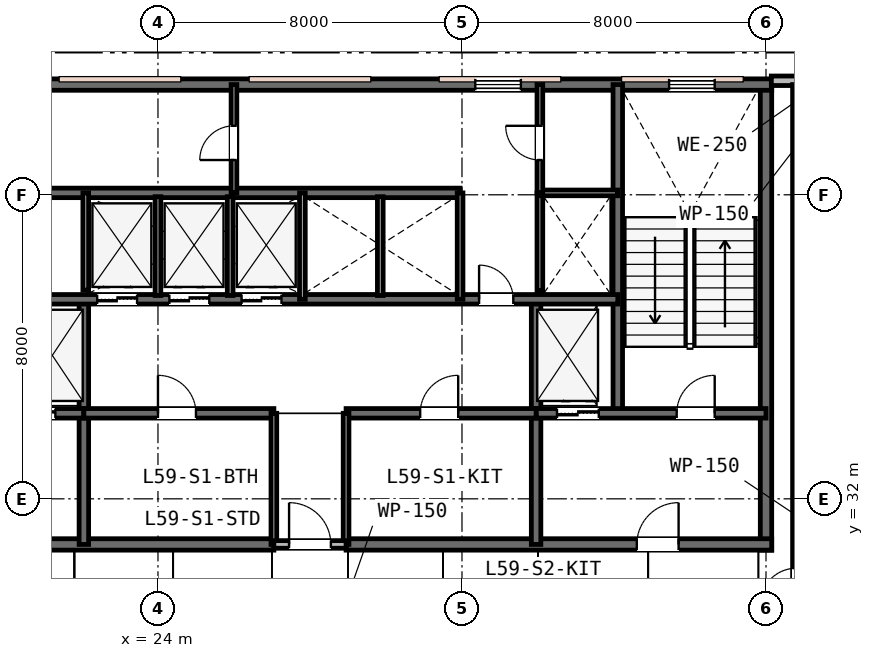
"""IFC4 building model, lengths in metres.
Left out: names, types, materials, properties, quantities, classifications, styles, units other than length and angle.
Written with IfcOpenShell. Run it as: python <this file> out.ifc"""

import sys

from ifc_helpers import new_model, si_unit, direction, frame, frame_2d, origin, place, context, subcontext, project, spatial, rectangle, extrude, element, fill, save


model = new_model("IFC4")
c1 = context("Model", 3, precision=1e-05, world=origin(), true_north=direction((0.0, 1.0)))
c2 = subcontext(c1, "Body", "Model", "MODEL_VIEW")
j1 = project(units=[si_unit("LENGTHUNIT", "METRE"), si_unit("PLANEANGLEUNIT", "RADIAN")], contexts=[c1])
p1 = place(None, origin())
s1 = spatial("IfcSite", under=j1, at=p1, CompositionType="ELEMENT")
p2 = place(p1, origin())
s2 = spatial("IfcBuilding", under=s1, at=p2, CompositionType="ELEMENT")
p3 = place(p2, frame((0.0, 0.0, 229.8)))
s3 = spatial("IfcBuildingStorey", under=s2, at=p3, CompositionType="ELEMENT", Elevation=229.8)
p4 = place(p3, frame((40.0, 30.65, 0.0), z_axis=(0.0, 0.0, 1.0), x_axis=(0.0, 1.0, 0.0)))
e1 = element("IfcWall", 1, at=p4, inside=s3, PredefinedType="SHEAR", context=c2, shape_type="SweptSolid", body=[
    extrude(rectangle(XDim=12.3, YDim=0.3, at=frame_2d((6.15, 0.0))), origin(), (0.0, 0.0, 1.0), 3.8),
])
p5 = place(p3, frame((15.85, 42.9, 0.0), z_axis=(0.0, 0.0, 1.0), x_axis=(1.0, 0.0, 0.0)))
e2 = element("IfcWall", 2, at=p5, inside=s3, PredefinedType="SHEAR", context=c2, shape_type="SweptSolid", body=[
    extrude(rectangle(XDim=24.3, YDim=0.3, at=frame_2d((12.15, 0.0))), origin(), (0.0, 0.0, 1.0), 3.8),
])
p6 = place(p5, frame((1.6, 0.0, 0.95)))
e3 = element("IfcOpeningElement", 3, at=p6, cuts=e2, PredefinedType="OPENING", context=c2, shape_type="SweptSolid", body=[
    extrude(rectangle(XDim=1.2, YDim=1.6, at=frame_2d((0.6, 0.8))), frame((0.0, 0.16, 0.0), z_axis=(0.0, -1.0, 0.0), x_axis=(1.0, 0.0, 0.0)), (0.0, 0.0, 1.0), 0.32),
])
p7 = place(p5, frame((16.5, 0.0, 0.95)))
e4 = element("IfcOpeningElement", 4, at=p7, cuts=e2, PredefinedType="OPENING", context=c2, shape_type="SweptSolid", body=[
    extrude(rectangle(XDim=1.2, YDim=1.6, at=frame_2d((0.6, 0.8))), frame((0.0, 0.16, 0.0), z_axis=(0.0, -1.0, 0.0), x_axis=(1.0, 0.0, 0.0)), (0.0, 0.0, 1.0), 0.32),
])
p8 = place(p5, frame((21.6, 0.0, 0.95)))
e5 = element("IfcOpeningElement", 5, at=p8, cuts=e2, PredefinedType="OPENING", context=c2, shape_type="SweptSolid", body=[
    extrude(rectangle(XDim=1.2, YDim=1.6, at=frame_2d((0.6, 0.8))), frame((0.0, 0.16, 0.0), z_axis=(0.0, -1.0, 0.0), x_axis=(1.0, 0.0, 0.0)), (0.0, 0.0, 1.0), 0.32),
])
p9 = place(p3, frame((15.85, 30.8, 0.0), z_axis=(0.0, 0.0, 1.0), x_axis=(1.0, 0.0, 0.0)))
e6 = element("IfcWall", 6, at=p9, inside=s3, PredefinedType="SHEAR", context=c2, shape_type="SweptSolid", body=[
    extrude(rectangle(XDim=11.2, YDim=0.3, at=frame_2d((5.6, 0.0))), origin(), (0.0, 0.0, 1.0), 3.8),
])
p10 = place(p9, frame((2.45, 0.0, 0.0)))
e7 = element("IfcOpeningElement", 7, at=p10, cuts=e6, PredefinedType="OPENING", context=c2, shape_type="SweptSolid", body=[
    extrude(rectangle(XDim=1.1, YDim=2.15, at=frame_2d((0.55, 1.075))), frame((0.0, 0.16, 0.0), z_axis=(0.0, -1.0, 0.0), x_axis=(1.0, 0.0, 0.0)), (0.0, 0.0, 1.0), 0.32),
])
p11 = place(p3, frame((28.95, 30.8, 0.0), z_axis=(0.0, 0.0, 1.0), x_axis=(1.0, 0.0, 0.0)))
e8 = element("IfcWall", 8, at=p11, inside=s3, PredefinedType="SHEAR", context=c2, shape_type="SweptSolid", body=[
    extrude(rectangle(XDim=11.2, YDim=0.3, at=frame_2d((5.6, 0.0))), origin(), (0.0, 0.0, 1.0), 3.8),
])
p12 = place(p11, frame((7.65, 0.0, 0.0)))
e9 = element("IfcOpeningElement", 9, at=p12, cuts=e8, PredefinedType="OPENING", context=c2, shape_type="SweptSolid", body=[
    extrude(rectangle(XDim=1.1, YDim=2.15, at=frame_2d((0.55, 1.075))), frame((0.0, 0.16, 0.0), z_axis=(0.0, -1.0, 0.0), x_axis=(1.0, 0.0, 0.0)), (0.0, 0.0, 1.0), 0.32),
])
p13 = place(p3, frame((36.1, 34.25, 0.0), z_axis=(0.0, 0.0, 1.0), x_axis=(0.0, 1.0, 0.0)))
e10 = element("IfcWall", 10, at=p13, inside=s3, PredefinedType="SHEAR", context=c2, shape_type="SweptSolid", body=[
    extrude(rectangle(XDim=8.65, YDim=0.25, at=frame_2d((4.325, 0.0))), origin(), (0.0, 0.0, 1.0), 3.8),
])
for number, where, z_axis, x_axis in (
    (11, (22.05, 30.8, 0.0), (0.0, 0.0, 1.0), (0.0, 1.0, 0.0)),
    (12, (33.95, 30.8, 0.0), (0.0, 0.0, 1.0), (0.0, 1.0, 0.0)),
):
    element("IfcWall", number, at=place(p3, frame(where, z_axis=z_axis, x_axis=x_axis)), inside=s3, PredefinedType="SHEAR", context=c2, shape_type="SweptSolid", body=[
        extrude(rectangle(XDim=6.45, YDim=0.25, at=frame_2d((3.225, 0.0))), origin(), (0.0, 0.0, 1.0), 3.8),
    ])
p14 = place(p3, frame((16.0, 34.25, 0.0), z_axis=(0.0, 0.0, 1.0), x_axis=(1.0, 0.0, 0.0)))
e13 = element("IfcWall", 13, at=p14, inside=s3, PredefinedType="SHEAR", context=c2, shape_type="SweptSolid", body=[
    extrude(rectangle(XDim=6.05, YDim=0.25, at=frame_2d((3.025, 0.0))), origin(), (0.0, 0.0, 1.0), 3.8),
])
p15 = place(p14, frame((1.25, 0.0, 0.0)))
e14 = element("IfcOpeningElement", 14, at=p15, cuts=e13, PredefinedType="OPENING", context=c2, shape_type="SweptSolid", body=[
    extrude(rectangle(XDim=1.0, YDim=2.15, at=frame_2d((0.5, 1.075))), frame((0.0, 0.135, 0.0), z_axis=(0.0, -1.0, 0.0), x_axis=(1.0, 0.0, 0.0)), (0.0, 0.0, 1.0), 0.27),
])
p16 = place(p14, frame((4.2, 0.0, 0.0)))
e15 = element("IfcOpeningElement", 15, at=p16, cuts=e13, PredefinedType="OPENING", context=c2, shape_type="SweptSolid", body=[
    extrude(rectangle(XDim=1.1, YDim=2.15, at=frame_2d((0.55, 1.075))), frame((0.0, 0.135, 0.0), z_axis=(0.0, -1.0, 0.0), x_axis=(1.0, 0.0, 0.0)), (0.0, 0.0, 1.0), 0.27),
])
p17 = place(p3, frame((33.95, 34.25, 0.0), z_axis=(0.0, 0.0, 1.0), x_axis=(1.0, 0.0, 0.0)))
e16 = element("IfcWall", 16, at=p17, inside=s3, PredefinedType="SHEAR", context=c2, shape_type="SweptSolid", body=[
    extrude(rectangle(XDim=6.05, YDim=0.25, at=frame_2d((3.025, 0.0))), origin(), (0.0, 0.0, 1.0), 3.8),
])
p18 = place(p17, frame((3.7, 0.0, 0.0)))
e17 = element("IfcOpeningElement", 17, at=p18, cuts=e16, PredefinedType="OPENING", context=c2, shape_type="SweptSolid", body=[
    extrude(rectangle(XDim=1.0, YDim=2.15, at=frame_2d((0.5, 1.075))), frame((0.0, 0.135, 0.0), z_axis=(0.0, -1.0, 0.0), x_axis=(1.0, 0.0, 0.0)), (0.0, 0.0, 1.0), 0.27),
])
p19 = place(p17, frame((0.55, 0.0, 0.0)))
e18 = element("IfcOpeningElement", 18, at=p19, cuts=e16, PredefinedType="OPENING", context=c2, shape_type="SweptSolid", body=[
    extrude(rectangle(XDim=1.1, YDim=2.15, at=frame_2d((0.55, 1.075))), frame((0.0, 0.135, 0.0), z_axis=(0.0, -1.0, 0.0), x_axis=(1.0, 0.0, 0.0)), (0.0, 0.0, 1.0), 0.27),
])
p20 = place(p3, frame((22.05, 34.25, 0.0), z_axis=(0.0, 0.0, 1.0), x_axis=(1.0, 0.0, 0.0)))
e19 = element("IfcWall", 19, at=p20, inside=s3, PredefinedType="SHEAR", context=c2, shape_type="SweptSolid", body=[
    extrude(rectangle(XDim=5.0, YDim=0.25, at=frame_2d((2.5, 0.0))), origin(), (0.0, 0.0, 1.0), 3.8),
])
p21 = place(p20, frame((1.95, 0.0, 0.0)))
e20 = element("IfcOpeningElement", 20, at=p21, cuts=e19, PredefinedType="OPENING", context=c2, shape_type="SweptSolid", body=[
    extrude(rectangle(XDim=1.0, YDim=2.15, at=frame_2d((0.5, 1.075))), frame((0.0, 0.135, 0.0), z_axis=(0.0, -1.0, 0.0), x_axis=(1.0, 0.0, 0.0)), (0.0, 0.0, 1.0), 0.27),
])
p22 = place(p3, frame((28.95, 34.25, 0.0), z_axis=(0.0, 0.0, 1.0), x_axis=(1.0, 0.0, 0.0)))
e21 = element("IfcWall", 21, at=p22, inside=s3, PredefinedType="SHEAR", context=c2, shape_type="SweptSolid", body=[
    extrude(rectangle(XDim=5.0, YDim=0.25, at=frame_2d((2.5, 0.0))), origin(), (0.0, 0.0, 1.0), 3.8),
])
p23 = place(p22, frame((1.95, 0.0, 0.0)))
e22 = element("IfcOpeningElement", 22, at=p23, cuts=e21, PredefinedType="OPENING", context=c2, shape_type="SweptSolid", body=[
    extrude(rectangle(XDim=1.0, YDim=2.15, at=frame_2d((0.5, 1.075))), frame((0.0, 0.135, 0.0), z_axis=(0.0, -1.0, 0.0), x_axis=(1.0, 0.0, 0.0)), (0.0, 0.0, 1.0), 0.27),
])
p24 = place(p3, frame((19.9, 37.25, 0.0), z_axis=(0.0, 0.0, 1.0), x_axis=(1.0, 0.0, 0.0)))
e23 = element("IfcWall", 23, at=p24, inside=s3, PredefinedType="SHEAR", context=c2, shape_type="SweptSolid", body=[
    extrude(rectangle(XDim=16.2, YDim=0.25, at=frame_2d((8.1, 0.0))), origin(), (0.0, 0.0, 1.0), 3.8),
])
p25 = place(p24, frame((12.55, 0.0, 0.0)))
e24 = element("IfcOpeningElement", 24, at=p25, cuts=e23, PredefinedType="OPENING", context=c2, shape_type="SweptSolid", body=[
    extrude(rectangle(XDim=0.9, YDim=2.15, at=frame_2d((0.45, 1.075))), frame((0.0, 0.135, 0.0), z_axis=(0.0, -1.0, 0.0), x_axis=(1.0, 0.0, 0.0)), (0.0, 0.0, 1.0), 0.27),
])
p26 = place(p24, frame((2.5, 0.0, 0.0)))
e25 = element("IfcOpeningElement", 25, at=p26, cuts=e23, PredefinedType="OPENING", context=c2, shape_type="SweptSolid", body=[
    extrude(rectangle(XDim=1.05, YDim=2.15, at=frame_2d((0.525, 1.075))), frame((0.0, 0.135, 0.0), z_axis=(0.0, -1.0, 0.0), x_axis=(1.0, 0.0, 0.0)), (0.0, 0.0, 1.0), 0.27),
])
p27 = place(p24, frame((4.4, 0.0, 0.0)))
e26 = element("IfcOpeningElement", 26, at=p27, cuts=e23, PredefinedType="OPENING", context=c2, shape_type="SweptSolid", body=[
    extrude(rectangle(XDim=1.05, YDim=2.15, at=frame_2d((0.525, 1.075))), frame((0.0, 0.135, 0.0), z_axis=(0.0, -1.0, 0.0), x_axis=(1.0, 0.0, 0.0)), (0.0, 0.0, 1.0), 0.27),
])
p28 = place(p24, frame((6.3, 0.0, 0.0)))
e27 = element("IfcOpeningElement", 27, at=p28, cuts=e23, PredefinedType="OPENING", context=c2, shape_type="SweptSolid", body=[
    extrude(rectangle(XDim=1.05, YDim=2.15, at=frame_2d((0.525, 1.075))), frame((0.0, 0.135, 0.0), z_axis=(0.0, -1.0, 0.0), x_axis=(1.0, 0.0, 0.0)), (0.0, 0.0, 1.0), 0.27),
])
p29 = place(p3, frame((19.9, 40.05, 0.0), z_axis=(0.0, 0.0, 1.0), x_axis=(1.0, 0.0, 0.0)))
e28 = element("IfcWall", 28, at=p29, inside=s3, PredefinedType="SHEAR", context=c2, shape_type="SweptSolid", body=[
    extrude(rectangle(XDim=12.05, YDim=0.25, at=frame_2d((6.025, 0.0))), origin(), (0.0, 0.0, 1.0), 3.8),
])
p30 = place(p3, frame((43.0, 43.0, 0.0), z_axis=(0.0, 0.0, 1.0), x_axis=(-1.0, 0.0, 0.0)))
e29 = element("IfcWall", 29, at=p30, inside=s3, PredefinedType="STANDARD", context=c2, shape_type="SweptSolid", body=[
    extrude(rectangle(XDim=2.86, YDim=0.25, at=frame_2d((1.43, 0.0))), origin(), (0.0, 0.0, 1.0), 3.53),
])
p31 = place(p30, frame((0.51, 0.0, 0.85)))
e30 = element("IfcOpeningElement", 30, at=p31, cuts=e29, PredefinedType="OPENING", context=c2, shape_type="SweptSolid", body=[
    extrude(rectangle(XDim=1.2, YDim=1.6, at=frame_2d((0.6, 0.8))), frame((0.0, 0.135, 0.0), z_axis=(0.0, -1.0, 0.0), x_axis=(1.0, 0.0, 0.0)), (0.0, 0.0, 1.0), 0.27),
])
for number, where, z_axis, x_axis in (
    (31, (27.05, 30.8, 0.0), (0.0, 0.0, 1.0), (0.0, 1.0, 0.0)),
    (32, (28.95, 30.8, 0.0), (0.0, 0.0, 1.0), (0.0, 1.0, 0.0)),
):
    element("IfcWall", number, at=place(p3, frame(where, z_axis=z_axis, x_axis=x_axis)), inside=s3, PredefinedType="PLUMBINGWALL", context=c2, shape_type="SweptSolid", body=[
        extrude(rectangle(XDim=3.45, YDim=0.15, at=frame_2d((1.725, 0.0))), origin(), (0.0, 0.0, 1.0), 3.22),
    ])
p32 = place(p3, frame((27.05, 30.8, 0.0), z_axis=(0.0, 0.0, 1.0), x_axis=(1.0, 0.0, 0.0)))
e33 = element("IfcWall", 33, at=p32, inside=s3, PredefinedType="PARTITIONING", context=c2, shape_type="SweptSolid", body=[
    extrude(rectangle(XDim=1.9, YDim=0.2, at=frame_2d((0.95, 0.0))), origin(), (0.0, 0.0, 1.0), 3.22),
])
p33 = place(p32, frame((0.4, 0.0, 0.0)))
e34 = element("IfcOpeningElement", 34, at=p33, cuts=e33, PredefinedType="OPENING", context=c2, shape_type="SweptSolid", body=[
    extrude(rectangle(XDim=1.1, YDim=2.15, at=frame_2d((0.55, 1.075))), frame((0.0, 0.11, 0.0), z_axis=(0.0, -1.0, 0.0), x_axis=(1.0, 0.0, 0.0)), (0.0, 0.0, 1.0), 0.22),
])
p34 = place(p3, frame((22.1, 37.49, 0.0), z_axis=(0.0, 0.0, 1.0), x_axis=(0.0, 1.0, 0.0)))
e35 = element("IfcWall", 35, at=p34, inside=s3, PredefinedType="PLUMBINGWALL", context=c2, shape_type="SweptSolid", body=[
    extrude(rectangle(XDim=2.56, YDim=0.15, at=frame_2d((1.28, 0.0))), origin(), (0.0, 0.0, 1.0), 3.53),
])
p35 = place(p3, frame((27.8, 37.25, 0.0), z_axis=(0.0, 0.0, 1.0), x_axis=(0.0, 1.0, 0.0)))
e36 = element("IfcWall", 36, at=p35, inside=s3, PredefinedType="PLUMBINGWALL", context=c2, shape_type="SweptSolid", body=[
    extrude(rectangle(XDim=2.8, YDim=0.15, at=frame_2d((1.4, 0.0))), origin(), (0.0, 0.0, 1.0), 3.53),
])
for number, where, z_axis, x_axis in (
    (37, (24.0, 37.35, 0.0), (0.0, 0.0, 1.0), (0.0, 1.0, 0.0)),
    (38, (25.9, 37.35, 0.0), (0.0, 0.0, 1.0), (0.0, 1.0, 0.0)),
):
    element("IfcWall", number, at=place(p3, frame(where, z_axis=z_axis, x_axis=x_axis)), inside=s3, PredefinedType="PLUMBINGWALL", context=c2, shape_type="SweptSolid", body=[
        extrude(rectangle(XDim=2.6, YDim=0.15, at=frame_2d((1.3, 0.0))), origin(), (0.0, 0.0, 1.0), 3.53),
    ])
p36 = place(p3, frame((31.95, 37.25, 0.0), z_axis=(0.0, 0.0, 1.0), x_axis=(0.0, 1.0, 0.0)))
e39 = element("IfcWall", 39, at=p36, inside=s3, PredefinedType="PLUMBINGWALL", context=c2, shape_type="SweptSolid", body=[
    extrude(rectangle(XDim=2.8, YDim=0.15, at=frame_2d((1.4, 0.0))), origin(), (0.0, 0.0, 1.0), 3.53),
])
p37 = place(p3, frame((29.85, 37.35, 0.0), z_axis=(0.0, 0.0, 1.0), x_axis=(0.0, 1.0, 0.0)))
e40 = element("IfcWall", 40, at=p37, inside=s3, PredefinedType="PLUMBINGWALL", context=c2, shape_type="SweptSolid", body=[
    extrude(rectangle(XDim=2.6, YDim=0.15, at=frame_2d((1.3, 0.0))), origin(), (0.0, 0.0, 1.0), 3.53),
])
p38 = place(p3, frame((34.05, 37.473, 0.0), z_axis=(0.0, 0.0, 1.0), x_axis=(0.0, 1.0, 0.0)))
e41 = element("IfcWall", 41, at=p38, inside=s3, PredefinedType="PLUMBINGWALL", context=c2, shape_type="SweptSolid", body=[
    extrude(rectangle(XDim=2.577, YDim=0.15, at=frame_2d((1.288, 0.0))), origin(), (0.0, 0.0, 1.0), 3.53),
])
p39 = place(p3, frame((34.05, 40.05, 0.0), z_axis=(0.0, 0.0, 1.0), x_axis=(1.0, 0.0, 0.0)))
e42 = element("IfcWall", 42, at=p39, inside=s3, PredefinedType="PARTITIONING", context=c2, shape_type="SweptSolid", body=[
    extrude(rectangle(XDim=2.05, YDim=0.15, at=frame_2d((1.025, 0.0))), origin(), (0.0, 0.0, 1.0), 3.53),
])
p40 = place(p3, frame((34.05, 40.05, 0.0), z_axis=(0.0, 0.0, 1.0), x_axis=(0.0, 1.0, 0.0)))
e43 = element("IfcWall", 43, at=p40, inside=s3, PredefinedType="PARTITIONING", context=c2, shape_type="SweptSolid", body=[
    extrude(rectangle(XDim=2.85, YDim=0.15, at=frame_2d((1.425, 0.0))), origin(), (0.0, 0.0, 1.0), 3.53),
])
p41 = place(p40, frame((0.865, 0.0, 0.0)))
e44 = element("IfcOpeningElement", 44, at=p41, cuts=e43, PredefinedType="OPENING", context=c2, shape_type="SweptSolid", body=[
    extrude(rectangle(XDim=0.9, YDim=2.15, at=frame_2d((0.45, 1.075))), frame((0.0, 0.085, 0.0), z_axis=(0.0, -1.0, 0.0), x_axis=(1.0, 0.0, 0.0)), (0.0, 0.0, 1.0), 0.17),
])
p42 = place(p3, frame((26.0, 40.05, 0.0), z_axis=(0.0, 0.0, 1.0), x_axis=(0.0, 1.0, 0.0)))
e45 = element("IfcWall", 45, at=p42, inside=s3, PredefinedType="PARTITIONING", context=c2, shape_type="SweptSolid", body=[
    extrude(rectangle(XDim=2.85, YDim=0.15, at=frame_2d((1.425, 0.0))), origin(), (0.0, 0.0, 1.0), 3.53),
])
p43 = place(p42, frame((0.865, 0.0, 0.0)))
e46 = element("IfcOpeningElement", 46, at=p43, cuts=e45, PredefinedType="OPENING", context=c2, shape_type="SweptSolid", body=[
    extrude(rectangle(XDim=0.9, YDim=2.15, at=frame_2d((0.45, 1.075))), frame((0.0, 0.085, 0.0), z_axis=(0.0, -1.0, 0.0), x_axis=(1.0, 0.0, 0.0)), (0.0, 0.0, 1.0), 0.17),
])
p44 = place(p3, frame((40.8, 28.6, 0.0), z_axis=(0.0, 0.0, 1.0), x_axis=(0.0, 1.0, 0.0)))
e47 = element("IfcWall", 47, at=p44, inside=s3, PredefinedType="PARTITIONING", context=c2, shape_type="SweptSolid", body=[
    extrude(rectangle(XDim=14.3, YDim=0.2, at=frame_2d((7.15, 0.0))), origin(), (0.0, 0.0, 1.0), 2.92),
])
p45 = place(p44, frame((0.625, 0.0, 0.0)))
e48 = element("IfcOpeningElement", 48, at=p45, cuts=e47, PredefinedType="OPENING", context=c2, shape_type="SweptSolid", body=[
    extrude(rectangle(XDim=0.95, YDim=2.15, at=frame_2d((0.475, 1.075))), frame((0.0, 0.11, 0.0), z_axis=(0.0, -1.0, 0.0), x_axis=(1.0, 0.0, 0.0)), (0.0, 0.0, 1.0), 0.22),
])
p46 = place(p7, origin())
e49 = element("IfcWindow", 49, at=p46, inside=s3, PartitioningType="SINGLE_PANEL", PredefinedType="WINDOW", context=c2, shape_type="SweptSolid", body=[
    extrude(rectangle(XDim=1.2, YDim=1.6, at=frame_2d((0.6, 0.8))), frame((0.0, 0.03, 0.0), z_axis=(0.0, -1.0, 0.0), x_axis=(1.0, 0.0, 0.0)), (0.0, 0.0, 1.0), 0.06),
])
fill(e4, e49)
p47 = place(p8, origin())
e50 = element("IfcWindow", 50, at=p47, inside=s3, PartitioningType="SINGLE_PANEL", PredefinedType="WINDOW", context=c2, shape_type="SweptSolid", body=[
    extrude(rectangle(XDim=1.2, YDim=1.6, at=frame_2d((0.6, 0.8))), frame((0.0, 0.03, 0.0), z_axis=(0.0, -1.0, 0.0), x_axis=(1.0, 0.0, 0.0)), (0.0, 0.0, 1.0), 0.06),
])
fill(e5, e50)
p48 = place(p33, origin())
e51 = element("IfcDoor", 51, at=p48, inside=s3, OperationType="SINGLE_SWING_LEFT", PredefinedType="DOOR", context=c2, shape_type="SweptSolid", body=[
    extrude(rectangle(XDim=1.1, YDim=2.15, at=frame_2d((0.55, 1.075))), frame((0.0, 0.025, 0.0), z_axis=(0.0, -1.0, 0.0), x_axis=(1.0, 0.0, 0.0)), (0.0, 0.0, 1.0), 0.05),
])
fill(e34, e51)
p49 = place(p18, origin())
e52 = element("IfcDoor", 52, at=p49, inside=s3, OperationType="SINGLE_SWING_RIGHT", PredefinedType="DOOR", context=c2, shape_type="SweptSolid", body=[
    extrude(rectangle(XDim=1.0, YDim=2.15, at=frame_2d((0.5, 1.075))), frame((0.0, 0.025, 0.0), z_axis=(0.0, -1.0, 0.0), x_axis=(1.0, 0.0, 0.0)), (0.0, 0.0, 1.0), 0.05),
])
fill(e17, e52)
p50 = place(p12, origin())
e53 = element("IfcDoor", 53, at=p50, inside=s3, OperationType="SINGLE_SWING_RIGHT", PredefinedType="DOOR", context=c2, shape_type="SweptSolid", body=[
    extrude(rectangle(XDim=1.1, YDim=2.15, at=frame_2d((0.55, 1.075))), frame((0.0, 0.025, 0.0), z_axis=(0.0, -1.0, 0.0), x_axis=(1.0, 0.0, 0.0)), (0.0, 0.0, 1.0), 0.05),
])
fill(e9, e53)
p51 = place(p21, origin())
e54 = element("IfcDoor", 54, at=p51, inside=s3, OperationType="SINGLE_SWING_LEFT", PredefinedType="DOOR", context=c2, shape_type="SweptSolid", body=[
    extrude(rectangle(XDim=1.0, YDim=2.15, at=frame_2d((0.5, 1.075))), frame((0.0, 0.025, 0.0), z_axis=(0.0, -1.0, 0.0), x_axis=(1.0, 0.0, 0.0)), (0.0, 0.0, 1.0), 0.05),
])
fill(e20, e54)
p52 = place(p23, origin())
e55 = element("IfcDoor", 55, at=p52, inside=s3, OperationType="SINGLE_SWING_RIGHT", PredefinedType="DOOR", context=c2, shape_type="SweptSolid", body=[
    extrude(rectangle(XDim=1.0, YDim=2.15, at=frame_2d((0.5, 1.075))), frame((0.0, 0.025, 0.0), z_axis=(0.0, -1.0, 0.0), x_axis=(1.0, 0.0, 0.0)), (0.0, 0.0, 1.0), 0.05),
])
fill(e22, e55)
p53 = place(p25, origin())
e56 = element("IfcDoor", 56, at=p53, inside=s3, OperationType="SINGLE_SWING_LEFT", PredefinedType="DOOR", context=c2, shape_type="SweptSolid", body=[
    extrude(rectangle(XDim=0.9, YDim=2.15, at=frame_2d((0.45, 1.075))), frame((0.0, 0.025, 0.0), z_axis=(0.0, -1.0, 0.0), x_axis=(1.0, 0.0, 0.0)), (0.0, 0.0, 1.0), 0.05),
])
fill(e24, e56)
p54 = place(p41, origin())
e57 = element("IfcDoor", 57, at=p54, inside=s3, OperationType="SINGLE_SWING_RIGHT", PredefinedType="DOOR", context=c2, shape_type="SweptSolid", body=[
    extrude(rectangle(XDim=0.9, YDim=2.15, at=frame_2d((0.45, 1.075))), frame((0.0, 0.025, 0.0), z_axis=(0.0, -1.0, 0.0), x_axis=(1.0, 0.0, 0.0)), (0.0, 0.0, 1.0), 0.05),
])
fill(e44, e57)
p55 = place(p43, origin())
e58 = element("IfcDoor", 58, at=p55, inside=s3, OperationType="SINGLE_SWING_LEFT", PredefinedType="DOOR", context=c2, shape_type="SweptSolid", body=[
    extrude(rectangle(XDim=0.9, YDim=2.15, at=frame_2d((0.45, 1.075))), frame((0.0, 0.025, 0.0), z_axis=(0.0, -1.0, 0.0), x_axis=(1.0, 0.0, 0.0)), (0.0, 0.0, 1.0), 0.05),
])
fill(e46, e58)
p56 = place(p16, origin())
e59 = element("IfcDoor", 59, at=p56, inside=s3, OperationType="DOUBLE_DOOR_SLIDING", PredefinedType="DOOR", context=c2, shape_type="SweptSolid", body=[
    extrude(rectangle(XDim=1.1, YDim=2.15, at=frame_2d((0.55, 1.075))), frame((0.0, 0.025, 0.0), z_axis=(0.0, -1.0, 0.0), x_axis=(1.0, 0.0, 0.0)), (0.0, 0.0, 1.0), 0.05),
])
fill(e15, e59)
p57 = place(p19, origin())
e60 = element("IfcDoor", 60, at=p57, inside=s3, OperationType="DOUBLE_DOOR_SLIDING", PredefinedType="DOOR", context=c2, shape_type="SweptSolid", body=[
    extrude(rectangle(XDim=1.1, YDim=2.15, at=frame_2d((0.55, 1.075))), frame((0.0, 0.025, 0.0), z_axis=(0.0, -1.0, 0.0), x_axis=(1.0, 0.0, 0.0)), (0.0, 0.0, 1.0), 0.05),
])
fill(e18, e60)
p58 = place(p26, origin())
e61 = element("IfcDoor", 61, at=p58, inside=s3, OperationType="DOUBLE_DOOR_SLIDING", PredefinedType="DOOR", context=c2, shape_type="SweptSolid", body=[
    extrude(rectangle(XDim=1.05, YDim=2.15, at=frame_2d((0.525, 1.075))), frame((0.0, 0.025, 0.0), z_axis=(0.0, -1.0, 0.0), x_axis=(1.0, 0.0, 0.0)), (0.0, 0.0, 1.0), 0.05),
])
fill(e25, e61)
p59 = place(p27, origin())
e62 = element("IfcDoor", 62, at=p59, inside=s3, OperationType="DOUBLE_DOOR_SLIDING", PredefinedType="DOOR", context=c2, shape_type="SweptSolid", body=[
    extrude(rectangle(XDim=1.05, YDim=2.15, at=frame_2d((0.525, 1.075))), frame((0.0, 0.025, 0.0), z_axis=(0.0, -1.0, 0.0), x_axis=(1.0, 0.0, 0.0)), (0.0, 0.0, 1.0), 0.05),
])
fill(e26, e62)
p60 = place(p28, origin())
e63 = element("IfcDoor", 63, at=p60, inside=s3, OperationType="DOUBLE_DOOR_SLIDING", PredefinedType="DOOR", context=c2, shape_type="SweptSolid", body=[
    extrude(rectangle(XDim=1.05, YDim=2.15, at=frame_2d((0.525, 1.075))), frame((0.0, 0.025, 0.0), z_axis=(0.0, -1.0, 0.0), x_axis=(1.0, 0.0, 0.0)), (0.0, 0.0, 1.0), 0.05),
])
fill(e27, e63)
save(model, sys.argv[1])
